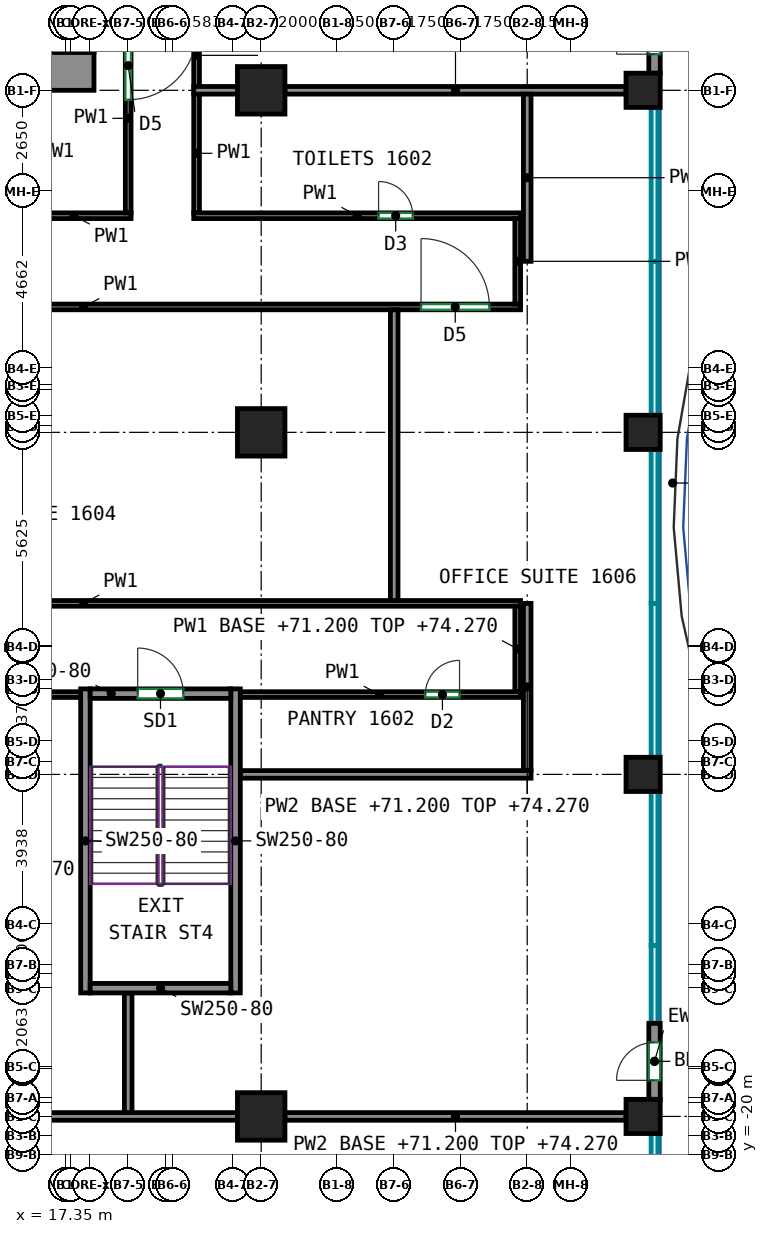
"""IFC4 building model, lengths in metres.
Left out: names, types, materials, properties, quantities, classifications, styles, units other than length and angle.
Written with IfcOpenShell. Run it as: python <this file> out.ifc"""

import sys

from ifc_helpers import new_model, si_unit, direction, frame, frame_2d, origin, origin_2d, place, context, subcontext, project, spatial, rectangle, extrude, source, transform, mapped, element, fill, save


model = new_model("IFC4")
c1 = context("Model", 3, precision=1e-05, world=origin(), true_north=direction((0.0, 1.0)))
c2 = subcontext(c1, "Body", "Model", "MODEL_VIEW")
j1 = project(units=[si_unit("LENGTHUNIT", "METRE"), si_unit("PLANEANGLEUNIT", "RADIAN")], contexts=[c1])
p1 = place(None, origin())
s1 = spatial("IfcSite", under=j1, at=p1, CompositionType="ELEMENT")
p2 = place(p1, origin())
s2 = spatial("IfcBuilding", under=s1, at=p2, CompositionType="ELEMENT")
p3 = place(p2, frame((0.0, 0.0, 71.2)))
s3 = spatial("IfcBuildingStorey", under=s2, at=p3, CompositionType="ELEMENT", Elevation=71.2)
m1 = source(origin(), c2, "Body", "SweptSolid", [
    extrude(rectangle(XDim=1.25, YDim=1.25, at=origin_2d()), origin(), (0.0, 0.0, 1.0), 3.72),
])
for number, where, z_axis, x_axis in (
    (1, (22.5, -19.0, 0.0), (0.0, 0.0, 1.0), (1.0, 0.0, 0.0)),
    (2, (22.5, -1.0, 0.0), (0.0, 0.0, 1.0), (1.0, 0.0, 0.0)),
    (3, (22.5, 8.0, 0.0), (0.0, 0.0, 1.0), (1.0, 0.0, 0.0)),
):
    element("IfcColumn", number, at=place(p3, frame(where, z_axis=z_axis, x_axis=x_axis)), inside=s3, PredefinedType="COLUMN", context=c2, shape_type="MappedRepresentation", body=[
        mapped(m1, transform((0.0, 0.0, 0.0))),
    ])
m2 = source(origin(), c2, "Body", "SweptSolid", [
    extrude(rectangle(XDim=0.9, YDim=0.9, at=origin_2d()), origin(), (0.0, 0.0, 1.0), 3.72),
])
for number, where, z_axis, x_axis in (
    (4, (32.55, -19.0, 0.0), (0.0, 0.0, 1.0), (1.0, 0.0, 0.0)),
    (5, (32.55, -10.0, 0.0), (0.0, 0.0, 1.0), (1.0, 0.0, 0.0)),
    (6, (32.55, -1.0, 0.0), (0.0, 0.0, 1.0), (1.0, 0.0, 0.0)),
    (7, (32.55, 8.0, 0.0), (0.0, 0.0, 1.0), (1.0, 0.0, 0.0)),
):
    element("IfcColumn", number, at=place(p3, frame(where, z_axis=z_axis, x_axis=x_axis)), inside=s3, PredefinedType="COLUMN", context=c2, shape_type="MappedRepresentation", body=[
        mapped(m2, transform((0.0, 0.0, 0.0))),
    ])
m3 = source(origin(), c2, "Body", "SweptSolid", [
    extrude(rectangle(XDim=5.63, YDim=1.0, at=frame_2d((2.815, 0.0))), origin(), (0.0, 0.0, 1.0), 3.72),
])
p4 = place(p3, frame((12.47, 8.5, 0.0), z_axis=(0.0, 0.0, 1.0), x_axis=(1.0, 0.0, 0.0)))
e8 = element("IfcWall", 8, at=p4, inside=s3, PredefinedType="SHEAR", context=c2, shape_type="MappedRepresentation", body=[
    mapped(m3, transform((0.0, 0.0, 0.0))),
])
p5 = place(p4, frame((2.18, 0.0, 0.0)))
e9 = element("IfcOpeningElement", 9, at=p5, cuts=e8, PredefinedType="OPENING", context=c2, shape_type="SweptSolid", body=[
    extrude(rectangle(XDim=1.2, YDim=2.1, at=frame_2d((0.6, 1.05))), frame((0.0, 0.51, 0.0), z_axis=(0.0, -1.0, 0.0), x_axis=(1.0, 0.0, 0.0)), (0.0, 0.0, 1.0), 1.02),
])
m4 = source(origin(), c2, "Body", "SweptSolid", [
    extrude(rectangle(XDim=8.0, YDim=0.25, at=frame_2d((4.0, 0.0))), origin(), (0.0, 0.0, 1.0), 3.72),
])
for number, where, z_axis, x_axis in (
    (10, (17.875, -15.75, 0.0), (0.0, 0.0, 1.0), (0.0, 1.0, 0.0)),
    (11, (21.825, -15.75, 0.0), (0.0, 0.0, 1.0), (0.0, 1.0, 0.0)),
):
    element("IfcWall", number, at=place(p3, frame(where, z_axis=z_axis, x_axis=x_axis)), inside=s3, PredefinedType="SHEAR", context=c2, shape_type="MappedRepresentation", body=[
        mapped(m4, transform((0.0, 0.0, 0.0))),
    ])
m5 = source(origin(), c2, "Body", "SweptSolid", [
    extrude(rectangle(XDim=3.7, YDim=0.25, at=frame_2d((1.85, 0.0))), origin(), (0.0, 0.0, 1.0), 3.72),
])
p6 = place(p3, frame((18.0, -15.625, 0.0), z_axis=(0.0, 0.0, 1.0), x_axis=(1.0, 0.0, 0.0)))
e12 = element("IfcWall", 12, at=p6, inside=s3, PredefinedType="SHEAR", context=c2, shape_type="MappedRepresentation", body=[
    mapped(m5, transform((0.0, 0.0, 0.0))),
])
p7 = place(p3, frame((18.0, -7.875, 0.0), z_axis=(0.0, 0.0, 1.0), x_axis=(1.0, 0.0, 0.0)))
e13 = element("IfcWall", 13, at=p7, inside=s3, PredefinedType="SHEAR", context=c2, shape_type="MappedRepresentation", body=[
    mapped(m5, transform((0.0, 0.0, 0.0))),
])
p8 = place(p7, frame((1.25, 0.0, 0.0)))
e14 = element("IfcOpeningElement", 14, at=p8, cuts=e13, PredefinedType="OPENING", context=c2, shape_type="SweptSolid", body=[
    extrude(rectangle(XDim=1.2, YDim=2.1, at=frame_2d((0.6, 1.05))), frame((0.0, 0.135, 0.0), z_axis=(0.0, -1.0, 0.0), x_axis=(1.0, 0.0, 0.0)), (0.0, 0.0, 1.0), 0.27),
])
m6 = source(origin(), c2, "Body", "SweptSolid", [
    extrude(rectangle(XDim=2.0, YDim=0.3, at=frame_2d((1.0, 0.0))), origin(), (0.0, 0.0, 1.0), 3.72),
])
p9 = place(p3, frame((32.85, -18.55, 0.0), z_axis=(0.0, 0.0, 1.0), x_axis=(0.0, 1.0, 0.0)))
e15 = element("IfcWall", 15, at=p9, inside=s3, PredefinedType="SOLIDWALL", context=c2, shape_type="MappedRepresentation", body=[
    mapped(m6, transform((0.0, 0.0, 0.0))),
])
p10 = place(p9, frame((0.5, 0.0, 0.0)))
e16 = element("IfcOpeningElement", 16, at=p10, cuts=e15, PredefinedType="OPENING", context=c2, shape_type="SweptSolid", body=[
    extrude(rectangle(XDim=1.0, YDim=2.1, at=frame_2d((0.5, 1.05))), frame((0.0, 0.16, 0.0), z_axis=(0.0, -1.0, 0.0), x_axis=(1.0, 0.0, 0.0)), (0.0, 0.0, 1.0), 0.32),
])
p11 = place(p3, frame((32.85, 8.45, 0.0), z_axis=(0.0, 0.0, 1.0), x_axis=(0.0, 1.0, 0.0)))
e17 = element("IfcWall", 17, at=p11, inside=s3, PredefinedType="SOLIDWALL", context=c2, shape_type="MappedRepresentation", body=[
    mapped(m6, transform((0.0, 0.0, 0.0))),
])
p12 = place(p11, frame((0.5, 0.0, 0.0)))
e18 = element("IfcOpeningElement", 18, at=p12, cuts=e17, PredefinedType="OPENING", context=c2, shape_type="SweptSolid", body=[
    extrude(rectangle(XDim=1.0, YDim=2.1, at=frame_2d((0.5, 1.05))), frame((0.0, 0.16, 0.0), z_axis=(0.0, -1.0, 0.0), x_axis=(1.0, 0.0, 0.0)), (0.0, 0.0, 1.0), 0.32),
])
p13 = place(p3, frame((-13.6, -7.9, 0.0), z_axis=(0.0, 0.0, 1.0), x_axis=(1.0, 0.0, 0.0)))
e19 = element("IfcWall", 19, at=p13, inside=s3, PredefinedType="PARTITIONING", context=c2, shape_type="SweptSolid", body=[
    extrude(rectangle(XDim=31.4, YDim=0.15, at=frame_2d((15.7, 0.0))), origin(), (0.0, 0.0, 1.0), 3.72),
])
p14 = place(p13, frame((11.501, 0.0, 0.0)))
e20 = element("IfcOpeningElement", 20, at=p14, cuts=e19, PredefinedType="OPENING", context=c2, shape_type="SweptSolid", body=[
    extrude(rectangle(XDim=0.9, YDim=2.1, at=frame_2d((0.45, 1.05))), frame((0.0, 0.085, 0.0), z_axis=(0.0, -1.0, 0.0), x_axis=(1.0, 0.0, 0.0)), (0.0, 0.0, 1.0), 0.17),
])
p15 = place(p13, frame((19.003, 0.0, 0.0)))
e21 = element("IfcOpeningElement", 21, at=p15, cuts=e19, PredefinedType="OPENING", context=c2, shape_type="SweptSolid", body=[
    extrude(rectangle(XDim=0.9, YDim=2.1, at=frame_2d((0.45, 1.05))), frame((0.0, 0.085, 0.0), z_axis=(0.0, -1.0, 0.0), x_axis=(1.0, 0.0, 0.0)), (0.0, 0.0, 1.0), 0.17),
])
p16 = place(p13, frame((23.291, 0.0, 0.0)))
e22 = element("IfcOpeningElement", 22, at=p16, cuts=e19, PredefinedType="OPENING", context=c2, shape_type="SweptSolid", body=[
    extrude(rectangle(XDim=0.9, YDim=2.1, at=frame_2d((0.45, 1.05))), frame((0.0, 0.085, 0.0), z_axis=(0.0, -1.0, 0.0), x_axis=(1.0, 0.0, 0.0)), (0.0, 0.0, 1.0), 0.17),
])
p17 = place(p3, frame((6.325, 2.3, 0.0), z_axis=(0.0, 0.0, 1.0), x_axis=(1.0, 0.0, 0.0)))
e23 = element("IfcWall", 23, at=p17, inside=s3, PredefinedType="PARTITIONING", context=c2, shape_type="SweptSolid", body=[
    extrude(rectangle(XDim=23.0, YDim=0.15, at=frame_2d((11.5, 0.0))), origin(), (0.0, 0.0, 1.0), 3.72),
])
p18 = place(p17, frame((9.443, 0.0, 0.0)))
e24 = element("IfcOpeningElement", 24, at=p18, cuts=e23, PredefinedType="OPENING", context=c2, shape_type="SweptSolid", body=[
    extrude(rectangle(XDim=1.0, YDim=2.1, at=frame_2d((0.5, 1.05))), frame((0.0, 0.085, 0.0), z_axis=(0.0, -1.0, 0.0), x_axis=(1.0, 0.0, 0.0)), (0.0, 0.0, 1.0), 0.17),
])
p19 = place(p17, frame((20.381, 0.0, 0.0)))
e25 = element("IfcOpeningElement", 25, at=p19, cuts=e23, PredefinedType="OPENING", context=c2, shape_type="SweptSolid", body=[
    extrude(rectangle(XDim=1.8, YDim=2.1, at=frame_2d((0.9, 1.05))), frame((0.0, 0.085, 0.0), z_axis=(0.0, -1.0, 0.0), x_axis=(1.0, 0.0, 0.0)), (0.0, 0.0, 1.0), 0.17),
])
p20 = place(p3, frame((6.325, -5.5, 0.0), z_axis=(0.0, 0.0, 1.0), x_axis=(1.0, 0.0, 0.0)))
e26 = element("IfcWall", 26, at=p20, inside=s3, PredefinedType="PARTITIONING", context=c2, shape_type="SweptSolid", body=[
    extrude(rectangle(XDim=23.0, YDim=0.15, at=frame_2d((11.5, 0.0))), origin(), (0.0, 0.0, 1.0), 3.72),
])
p21 = place(p3, frame((16.075, 4.7, 0.0), z_axis=(0.0, 0.0, 1.0), x_axis=(1.0, 0.0, 0.0)))
e27 = element("IfcWall", 27, at=p21, inside=s3, PredefinedType="PARTITIONING", context=c2, shape_type="SweptSolid", body=[
    extrude(rectangle(XDim=3.0, YDim=0.15, at=frame_2d((1.5, 0.0))), origin(), (0.0, 0.0, 1.0), 3.72),
])
p22 = place(p3, frame((19.0, 9.75, 0.0), z_axis=(0.0, 0.0, 1.0), x_axis=(0.0, -1.0, 0.0)))
e28 = element("IfcWall", 28, at=p22, inside=s3, PredefinedType="PARTITIONING", context=c2, shape_type="SweptSolid", body=[
    extrude(rectangle(XDim=4.975, YDim=0.15, at=frame_2d((2.488, 0.0))), origin(), (0.0, 0.0, 1.0), 3.72),
])
p23 = place(p22, frame((0.2, 0.0, 0.0)))
e29 = element("IfcOpeningElement", 29, at=p23, cuts=e28, PredefinedType="OPENING", context=c2, shape_type="SweptSolid", body=[
    extrude(rectangle(XDim=1.8, YDim=2.1, at=frame_2d((0.9, 1.05))), frame((0.0, 0.085, 0.0), z_axis=(0.0, -1.0, 0.0), x_axis=(1.0, 0.0, 0.0)), (0.0, 0.0, 1.0), 0.17),
])
p24 = place(p3, frame((20.8, 8.09, 0.0), z_axis=(0.0, 0.0, 1.0), x_axis=(0.0, 1.0, 0.0)))
e30 = element("IfcWall", 30, at=p24, inside=s3, PredefinedType="PARTITIONING", context=c2, shape_type="SweptSolid", body=[
    extrude(rectangle(XDim=1.66, YDim=0.15, at=frame_2d((0.83, 0.0))), origin(), (0.0, 0.0, 1.0), 3.72),
])
p25 = place(p3, frame((20.8, 4.775, 0.0), z_axis=(0.0, 0.0, 1.0), x_axis=(0.0, 1.0, 0.0)))
e31 = element("IfcWall", 31, at=p25, inside=s3, PredefinedType="PARTITIONING", context=c2, shape_type="SweptSolid", body=[
    extrude(rectangle(XDim=3.135, YDim=0.15, at=frame_2d((1.567, 0.0))), origin(), (0.0, 0.0, 1.0), 3.72),
])
p26 = place(p3, frame((20.725, 4.7, 0.0), z_axis=(0.0, 0.0, 1.0), x_axis=(1.0, 0.0, 0.0)))
e32 = element("IfcWall", 32, at=p26, inside=s3, PredefinedType="PARTITIONING", context=c2, shape_type="SweptSolid", body=[
    extrude(rectangle(XDim=8.6, YDim=0.15, at=frame_2d((4.3, 0.0))), origin(), (0.0, 0.0, 1.0), 3.72),
])
p27 = place(p26, frame((4.864, 0.0, 0.0)))
e33 = element("IfcOpeningElement", 33, at=p27, cuts=e32, PredefinedType="OPENING", context=c2, shape_type="SweptSolid", body=[
    extrude(rectangle(XDim=0.9, YDim=2.1, at=frame_2d((0.45, 1.05))), frame((0.0, 0.085, 0.0), z_axis=(0.0, -1.0, 0.0), x_axis=(1.0, 0.0, 0.0)), (0.0, 0.0, 1.0), 0.17),
])
p28 = place(p3, frame((29.25, -7.825, 0.0), z_axis=(0.0, 0.0, 1.0), x_axis=(0.0, 1.0, 0.0)))
e34 = element("IfcWall", 34, at=p28, inside=s3, PredefinedType="PARTITIONING", context=c2, shape_type="SweptSolid", body=[
    extrude(rectangle(XDim=2.25, YDim=0.15, at=frame_2d((1.125, 0.0))), origin(), (0.0, 0.0, 1.0), 3.07),
])
p29 = place(p3, frame((21.9, -7.9, 0.0), z_axis=(0.0, 0.0, 1.0), x_axis=(1.0, 0.0, 0.0)))
e35 = element("IfcWall", 35, at=p29, inside=s3, PredefinedType="PARTITIONING", context=c2, shape_type="SweptSolid", body=[
    extrude(rectangle(XDim=7.425, YDim=0.15, at=frame_2d((3.712, 0.0))), origin(), (0.0, 0.0, 1.0), 3.72),
])
p30 = place(p29, frame((4.919, 0.0, 0.0)))
e36 = element("IfcOpeningElement", 36, at=p30, cuts=e35, PredefinedType="OPENING", context=c2, shape_type="SweptSolid", body=[
    extrude(rectangle(XDim=0.9, YDim=2.1, at=frame_2d((0.45, 1.05))), frame((0.0, 0.085, 0.0), z_axis=(0.0, -1.0, 0.0), x_axis=(1.0, 0.0, 0.0)), (0.0, 0.0, 1.0), 0.17),
])
p31 = place(p3, frame((29.25, 2.375, 0.0), z_axis=(0.0, 0.0, 1.0), x_axis=(0.0, 1.0, 0.0)))
e37 = element("IfcWall", 37, at=p31, inside=s3, PredefinedType="PARTITIONING", context=c2, shape_type="SweptSolid", body=[
    extrude(rectangle(XDim=2.25, YDim=0.15, at=frame_2d((1.125, 0.0))), origin(), (0.0, 0.0, 1.0), 3.07),
])
p32 = place(p3, frame((16.125, -19.0, 0.0), z_axis=(0.0, 0.0, 1.0), x_axis=(1.0, 0.0, 0.0)))
e38 = element("IfcWall", 38, at=p32, inside=s3, PredefinedType="PARTITIONING", context=c2, shape_type="SweptSolid", body=[
    extrude(rectangle(XDim=5.75, YDim=0.2, at=frame_2d((2.875, 0.0))), origin(), (0.0, 0.0, 1.0), 3.72),
])
p33 = place(p3, frame((23.125, -19.0, 0.0), z_axis=(0.0, 0.0, 1.0), x_axis=(1.0, 0.0, 0.0)))
e39 = element("IfcWall", 39, at=p33, inside=s3, PredefinedType="PARTITIONING", context=c2, shape_type="SweptSolid", body=[
    extrude(rectangle(XDim=8.975, YDim=0.2, at=frame_2d((4.488, 0.0))), origin(), (0.0, 0.0, 1.0), 3.07),
])
p34 = place(p3, frame((26.0, -5.424, 0.0), z_axis=(0.0, 0.0, 1.0), x_axis=(0.0, 1.0, 0.0)))
e40 = element("IfcWall", 40, at=p34, inside=s3, PredefinedType="PARTITIONING", context=c2, shape_type="SweptSolid", body=[
    extrude(rectangle(XDim=7.648, YDim=0.2, at=frame_2d((3.824, 0.0))), origin(), (0.0, 0.0, 1.0), 3.72),
])
p35 = place(p3, frame((19.0, -18.9, 0.0), z_axis=(0.0, 0.0, 1.0), x_axis=(0.0, 1.0, 0.0)))
e41 = element("IfcWall", 41, at=p35, inside=s3, PredefinedType="PARTITIONING", context=c2, shape_type="SweptSolid", body=[
    extrude(rectangle(XDim=3.15, YDim=0.2, at=frame_2d((1.575, 0.0))), origin(), (0.0, 0.0, 1.0), 3.72),
])
p36 = place(p3, frame((23.125, 8.0, 0.0), z_axis=(0.0, 0.0, 1.0), x_axis=(1.0, 0.0, 0.0)))
e42 = element("IfcWall", 42, at=p36, inside=s3, PredefinedType="PARTITIONING", context=c2, shape_type="SweptSolid", body=[
    extrude(rectangle(XDim=8.975, YDim=0.2, at=frame_2d((4.488, 0.0))), origin(), (0.0, 0.0, 1.0), 3.07),
])
p37 = place(p3, frame((20.726, 8.0, 0.0), z_axis=(0.0, 0.0, 1.0), x_axis=(1.0, 0.0, 0.0)))
e43 = element("IfcWall", 43, at=p37, inside=s3, PredefinedType="PARTITIONING", context=c2, shape_type="SweptSolid", body=[
    extrude(rectangle(XDim=1.149, YDim=0.2, at=frame_2d((0.574, 0.0))), origin(), (0.0, 0.0, 1.0), 3.72),
])
for number, where, z_axis, x_axis in (
    (44, (29.5, 3.5, 0.0), (0.0, 0.0, 1.0), (0.0, 1.0, 0.0)),
    (45, (29.5, -9.9, 0.0), (0.0, 0.0, 1.0), (0.0, 1.0, 0.0)),
):
    element("IfcWall", number, at=place(p3, frame(where, z_axis=z_axis, x_axis=x_axis)), inside=s3, PredefinedType="PARTITIONING", context=c2, shape_type="SweptSolid", body=[
        extrude(rectangle(XDim=4.4, YDim=0.2, at=frame_2d((2.2, 0.0))), origin(), (0.0, 0.0, 1.0), 3.07),
    ])
p38 = place(p3, frame((21.95, -10.0, 0.0), z_axis=(0.0, 0.0, 1.0), x_axis=(1.0, 0.0, 0.0)))
e46 = element("IfcWall", 46, at=p38, inside=s3, PredefinedType="PARTITIONING", context=c2, shape_type="SweptSolid", body=[
    extrude(rectangle(XDim=7.65, YDim=0.2, at=frame_2d((3.825, 0.0))), origin(), (0.0, 0.0, 1.0), 3.72),
])
p39 = place(p10, origin())
e47 = element("IfcDoor", 47, at=p39, inside=s3, OperationType="SINGLE_SWING_LEFT", PredefinedType="DOOR", context=c2, shape_type="SweptSolid", body=[
    extrude(rectangle(XDim=1.0, YDim=2.1, at=frame_2d((0.5, 1.05))), frame((0.0, 0.025, 0.0), z_axis=(0.0, -1.0, 0.0), x_axis=(1.0, 0.0, 0.0)), (0.0, 0.0, 1.0), 0.05),
])
fill(e16, e47)
p40 = place(p12, origin())
e48 = element("IfcDoor", 48, at=p40, inside=s3, OperationType="SINGLE_SWING_LEFT", PredefinedType="DOOR", context=c2, shape_type="SweptSolid", body=[
    extrude(rectangle(XDim=1.0, YDim=2.1, at=frame_2d((0.5, 1.05))), frame((0.0, 0.025, 0.0), z_axis=(0.0, -1.0, 0.0), x_axis=(1.0, 0.0, 0.0)), (0.0, 0.0, 1.0), 0.05),
])
fill(e18, e48)
p41 = place(p8, origin())
e49 = element("IfcDoor", 49, at=p41, inside=s3, OperationType="DOUBLE_DOOR_SINGLE_SWING", PredefinedType="DOOR", context=c2, shape_type="SweptSolid", body=[
    extrude(rectangle(XDim=1.2, YDim=2.1, at=frame_2d((0.6, 1.05))), frame((0.0, 0.025, 0.0), z_axis=(0.0, -1.0, 0.0), x_axis=(1.0, 0.0, 0.0)), (0.0, 0.0, 1.0), 0.05),
])
fill(e14, e49)
p42 = place(p30, origin())
e50 = element("IfcDoor", 50, at=p42, inside=s3, OperationType="SINGLE_SWING_RIGHT", PredefinedType="DOOR", context=c2, shape_type="SweptSolid", body=[
    extrude(rectangle(XDim=0.9, YDim=2.1, at=frame_2d((0.45, 1.05))), frame((0.0, 0.025, 0.0), z_axis=(0.0, -1.0, 0.0), x_axis=(1.0, 0.0, 0.0)), (0.0, 0.0, 1.0), 0.05),
])
fill(e36, e50)
p43 = place(p19, origin())
e51 = element("IfcDoor", 51, at=p43, inside=s3, OperationType="DOUBLE_DOOR_SINGLE_SWING", PredefinedType="DOOR", context=c2, shape_type="SweptSolid", body=[
    extrude(rectangle(XDim=1.8, YDim=2.1, at=frame_2d((0.9, 1.05))), frame((0.0, 0.025, 0.0), z_axis=(0.0, -1.0, 0.0), x_axis=(1.0, 0.0, 0.0)), (0.0, 0.0, 1.0), 0.05),
])
fill(e25, e51)
p44 = place(p27, origin())
e52 = element("IfcDoor", 52, at=p44, inside=s3, OperationType="SINGLE_SWING_LEFT", PredefinedType="DOOR", context=c2, shape_type="SweptSolid", body=[
    extrude(rectangle(XDim=0.9, YDim=2.1, at=frame_2d((0.45, 1.05))), frame((0.0, 0.025, 0.0), z_axis=(0.0, -1.0, 0.0), x_axis=(1.0, 0.0, 0.0)), (0.0, 0.0, 1.0), 0.05),
])
fill(e33, e52)
p45 = place(p23, origin())
e53 = element("IfcDoor", 53, at=p45, inside=s3, OperationType="DOUBLE_DOOR_SINGLE_SWING", PredefinedType="DOOR", context=c2, shape_type="SweptSolid", body=[
    extrude(rectangle(XDim=1.8, YDim=2.1, at=frame_2d((0.9, 1.05))), frame((0.0, 0.025, 0.0), z_axis=(0.0, -1.0, 0.0), x_axis=(1.0, 0.0, 0.0)), (0.0, 0.0, 1.0), 0.05),
])
fill(e29, e53)
save(model, sys.argv[1])
